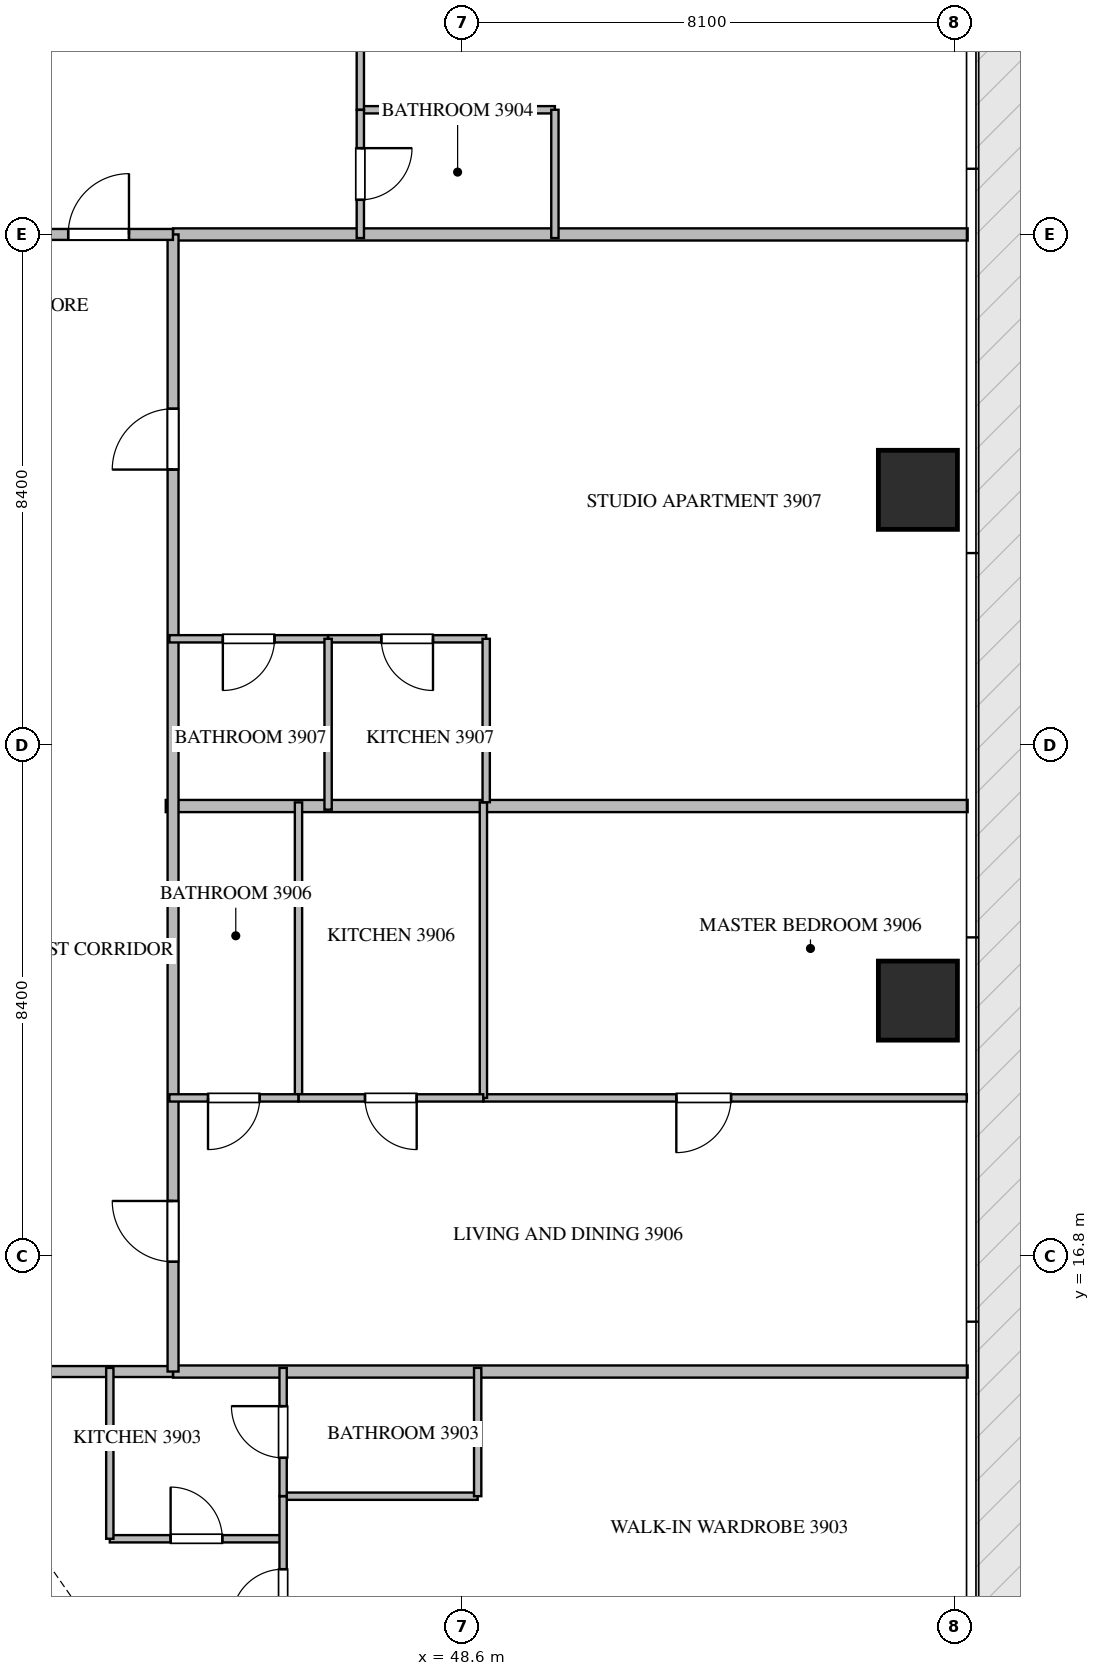
"""IFC4 building model, lengths in metres.
Left out: names, types, materials, properties, quantities, classifications, styles, units other than length and angle.
Written with IfcOpenShell. Run it as: python <this file> out.ifc"""

import sys

from ifc_helpers import new_model, si_unit, direction, frame, frame_2d, origin, origin_2d, place, context, subcontext, project, spatial, rectangle, extrude, source, transform, mapped, element, fill, save


model = new_model("IFC4")
c1 = context("Model", 3, precision=1e-05, world=origin(), true_north=direction((0.0, 1.0)))
c2 = subcontext(c1, "Body", "Model", "MODEL_VIEW")
j1 = project(units=[si_unit("LENGTHUNIT", "METRE"), si_unit("PLANEANGLEUNIT", "RADIAN")], contexts=[c1])
p1 = place(None, origin())
s1 = spatial("IfcSite", under=j1, at=p1, CompositionType="ELEMENT")
p2 = place(p1, origin())
s2 = spatial("IfcBuilding", under=s1, at=p2, CompositionType="ELEMENT")
p3 = place(p2, frame((0.0, 0.0, 157.65)))
s3 = spatial("IfcBuildingStorey", under=s2, at=p3, CompositionType="ELEMENT", Elevation=157.65)
m1 = source(origin(), c2, "Body", "SweptSolid", [
    extrude(rectangle(XDim=1.3, YDim=1.3, at=origin_2d()), origin(), (0.0, 0.0, 1.0), 3.75),
])
for number, where, z_axis, x_axis in (
    (1, (56.1, 21.0, -0.26), (0.0, 0.0, 1.0), (1.0, 0.0, 0.0)),
    (2, (56.1, 29.4, -0.26), (0.0, 0.0, 1.0), (1.0, 0.0, 0.0)),
):
    element("IfcColumn", number, at=place(p3, frame(where, z_axis=z_axis, x_axis=x_axis)), inside=s3, PredefinedType="COLUMN", context=c2, shape_type="MappedRepresentation", body=[
        mapped(m1, transform((0.0, 0.0, 0.0), scale=1.0)),
    ])
p4 = place(p3, frame((43.73, 24.2, 0.0), z_axis=(0.0, 0.0, 1.0), x_axis=(1.0, 0.0, 0.0)))
e3 = element("IfcWall", 3, at=p4, inside=s3, PredefinedType="PARTITIONING", context=c2, shape_type="SweptSolid", body=[
    extrude(rectangle(XDim=13.188, YDim=0.2, at=frame_2d((6.594, 0.0))), origin(), (0.0, 0.0, 1.0), 3.49),
])
for number, where, z_axis, x_axis in (
    (4, (43.85, 14.9, 0.0), (0.0, 0.0, 1.0), (1.0, 0.0, 0.0)),
    (5, (43.85, 33.6, 0.0), (0.0, 0.0, 1.0), (1.0, 0.0, 0.0)),
):
    element("IfcWall", number, at=place(p3, frame(where, z_axis=z_axis, x_axis=x_axis)), inside=s3, PredefinedType="PARTITIONING", context=c2, shape_type="SweptSolid", body=[
        extrude(rectangle(XDim=13.068, YDim=0.2, at=frame_2d((6.534, 0.0))), origin(), (0.0, 0.0, 1.0), 3.49),
    ])
p5 = place(p3, frame((20.952, 14.9, 0.0), z_axis=(0.0, 0.0, 1.0), x_axis=(1.0, 0.0, 0.0)))
e6 = element("IfcWall", 6, at=p5, inside=s3, PredefinedType="PARTITIONING", context=c2, shape_type="SweptSolid", body=[
    extrude(rectangle(XDim=22.896, YDim=0.18, at=frame_2d((11.448, 0.0))), origin(), (0.0, 0.0, 1.0), 3.49),
])
p6 = place(p5, frame((2.54, 0.0, 0.0)))
e7 = element("IfcOpeningElement", 7, at=p6, cuts=e6, PredefinedType="OPENING", context=c2, shape_type="SweptSolid", body=[
    extrude(rectangle(XDim=1.0, YDim=2.15, at=frame_2d((0.5, 1.075))), frame((0.0, 0.1, 0.0), z_axis=(0.0, -1.0, 0.0), x_axis=(1.0, 0.0, 0.0)), (0.0, 0.0, 1.0), 0.2),
])
p7 = place(p5, frame((6.985, 0.0, 0.0)))
e8 = element("IfcOpeningElement", 8, at=p7, cuts=e6, PredefinedType="OPENING", context=c2, shape_type="SweptSolid", body=[
    extrude(rectangle(XDim=1.0, YDim=2.15, at=frame_2d((0.5, 1.075))), frame((0.0, 0.1, 0.0), z_axis=(0.0, -1.0, 0.0), x_axis=(1.0, 0.0, 0.0)), (0.0, 0.0, 1.0), 0.2),
])
p8 = place(p5, frame((19.356, 0.0, 0.0)))
e9 = element("IfcOpeningElement", 9, at=p8, cuts=e6, PredefinedType="OPENING", context=c2, shape_type="SweptSolid", body=[
    extrude(rectangle(XDim=1.0, YDim=2.15, at=frame_2d((0.5, 1.075))), frame((0.0, 0.1, 0.0), z_axis=(0.0, -1.0, 0.0), x_axis=(1.0, 0.0, 0.0)), (0.0, 0.0, 1.0), 0.2),
])
p9 = place(p3, frame((43.85, 14.9, 0.0), z_axis=(0.0, 0.0, 1.0), x_axis=(0.0, 1.0, 0.0)))
e10 = element("IfcWall", 10, at=p9, inside=s3, PredefinedType="PARTITIONING", context=c2, shape_type="SweptSolid", body=[
    extrude(rectangle(XDim=18.7, YDim=0.18, at=frame_2d((9.35, 0.0))), origin(), (0.0, 0.0, 1.0), 3.49),
])
p10 = place(p9, frame((1.805, 0.0, 0.0)))
e11 = element("IfcOpeningElement", 11, at=p10, cuts=e10, PredefinedType="OPENING", context=c2, shape_type="SweptSolid", body=[
    extrude(rectangle(XDim=1.0, YDim=2.15, at=frame_2d((0.5, 1.075))), frame((0.0, 0.1, 0.0), z_axis=(0.0, -1.0, 0.0), x_axis=(1.0, 0.0, 0.0)), (0.0, 0.0, 1.0), 0.2),
])
p11 = place(p9, frame((14.833, 0.0, 0.0)))
e12 = element("IfcOpeningElement", 12, at=p11, cuts=e10, PredefinedType="OPENING", context=c2, shape_type="SweptSolid", body=[
    extrude(rectangle(XDim=1.0, YDim=2.15, at=frame_2d((0.5, 1.075))), frame((0.0, 0.1, 0.0), z_axis=(0.0, -1.0, 0.0), x_axis=(1.0, 0.0, 0.0)), (0.0, 0.0, 1.0), 0.2),
])
p12 = place(p3, frame((41.402, 33.6, 0.0), z_axis=(0.0, 0.0, 1.0), x_axis=(1.0, 0.0, 0.0)))
e13 = element("IfcWall", 13, at=p12, inside=s3, PredefinedType="PARTITIONING", context=c2, shape_type="SweptSolid", body=[
    extrude(rectangle(XDim=2.446, YDim=0.18, at=frame_2d((1.223, 0.0))), origin(), (0.0, 0.0, 1.0), 3.49),
])
p13 = place(p12, frame((0.723, 0.0, 0.0)))
e14 = element("IfcOpeningElement", 14, at=p13, cuts=e13, PredefinedType="OPENING", context=c2, shape_type="SweptSolid", body=[
    extrude(rectangle(XDim=1.0, YDim=2.15, at=frame_2d((0.5, 1.075))), frame((0.0, 0.1, 0.0), z_axis=(0.0, -1.0, 0.0), x_axis=(1.0, 0.0, 0.0)), (0.0, 0.0, 1.0), 0.2),
])
p14 = place(p3, frame((42.81, 12.15, 0.0), z_axis=(0.0, 0.0, 1.0), x_axis=(1.0, 0.0, 0.0)))
e15 = element("IfcWall", 15, at=p14, inside=s3, PredefinedType="PARTITIONING", context=c2, shape_type="SweptSolid", body=[
    extrude(rectangle(XDim=2.85, YDim=0.12, at=frame_2d((1.425, 0.0))), origin(), (0.0, 0.0, 1.0), 3.49),
])
p15 = place(p14, frame((1.0, 0.0, 0.0)))
e16 = element("IfcOpeningElement", 16, at=p15, cuts=e15, PredefinedType="OPENING", context=c2, shape_type="SweptSolid", body=[
    extrude(rectangle(XDim=0.85, YDim=2.1, at=frame_2d((0.425, 1.05))), frame((0.0, 0.07, 0.0), z_axis=(0.0, -1.0, 0.0), x_axis=(1.0, 0.0, 0.0)), (0.0, 0.0, 1.0), 0.14),
])
p16 = place(p3, frame((42.81, 12.15, 0.0), z_axis=(0.0, 0.0, 1.0), x_axis=(0.0, 1.0, 0.0)))
e17 = element("IfcWall", 17, at=p16, inside=s3, PredefinedType="PARTITIONING", context=c2, shape_type="SweptSolid", body=[
    extrude(rectangle(XDim=2.81, YDim=0.12, at=frame_2d((1.405, 0.0))), origin(), (0.0, 0.0, 1.0), 3.49),
])
p17 = place(p3, frame((45.66, 12.85, 0.0), z_axis=(0.0, 0.0, 1.0), x_axis=(1.0, 0.0, 0.0)))
e18 = element("IfcWall", 18, at=p17, inside=s3, PredefinedType="PARTITIONING", context=c2, shape_type="SweptSolid", body=[
    extrude(rectangle(XDim=3.2, YDim=0.12, at=frame_2d((1.6, 0.0))), origin(), (0.0, 0.0, 1.0), 3.49),
])
p18 = place(p3, frame((48.86, 12.85, 0.0), z_axis=(0.0, 0.0, 1.0), x_axis=(0.0, 1.0, 0.0)))
e19 = element("IfcWall", 19, at=p18, inside=s3, PredefinedType="PARTITIONING", context=c2, shape_type="SweptSolid", body=[
    extrude(rectangle(XDim=2.11, YDim=0.12, at=frame_2d((1.055, 0.0))), origin(), (0.0, 0.0, 1.0), 3.49),
])
p19 = place(p3, frame((45.66, 9.6, 0.0), z_axis=(0.0, 0.0, 1.0), x_axis=(0.0, 1.0, 0.0)))
e20 = element("IfcWall", 20, at=p19, inside=s3, PredefinedType="PARTITIONING", context=c2, shape_type="SweptSolid", body=[
    extrude(rectangle(XDim=3.25, YDim=0.12, at=frame_2d((1.625, 0.0))), origin(), (0.0, 0.0, 1.0), 3.49),
])
p20 = place(p19, frame((1.2, 0.0, 0.0)))
e21 = element("IfcOpeningElement", 21, at=p20, cuts=e20, PredefinedType="OPENING", context=c2, shape_type="SweptSolid", body=[
    extrude(rectangle(XDim=0.85, YDim=2.1, at=frame_2d((0.425, 1.05))), frame((0.0, 0.07, 0.0), z_axis=(0.0, -1.0, 0.0), x_axis=(1.0, 0.0, 0.0)), (0.0, 0.0, 1.0), 0.14),
])
p21 = place(p3, frame((45.66, 12.852, 0.0), z_axis=(0.0, 0.0, 1.0), x_axis=(0.0, 1.0, 0.0)))
e22 = element("IfcWall", 22, at=p21, inside=s3, PredefinedType="PARTITIONING", context=c2, shape_type="SweptSolid", body=[
    extrude(rectangle(XDim=2.108, YDim=0.12, at=frame_2d((1.054, 0.0))), origin(), (0.0, 0.0, 1.0), 3.49),
])
p22 = place(p21, frame((0.629, 0.0, 0.0)))
e23 = element("IfcOpeningElement", 23, at=p22, cuts=e22, PredefinedType="OPENING", context=c2, shape_type="SweptSolid", body=[
    extrude(rectangle(XDim=0.85, YDim=2.1, at=frame_2d((0.425, 1.05))), frame((0.0, 0.07, 0.0), z_axis=(0.0, -1.0, 0.0), x_axis=(1.0, 0.0, 0.0)), (0.0, 0.0, 1.0), 0.14),
])
p23 = place(p3, frame((46.93, 35.65, 0.0), z_axis=(0.0, 0.0, 1.0), x_axis=(1.0, 0.0, 0.0)))
e24 = element("IfcWall", 24, at=p23, inside=s3, PredefinedType="PARTITIONING", context=c2, shape_type="SweptSolid", body=[
    extrude(rectangle(XDim=3.2, YDim=0.12, at=frame_2d((1.6, 0.0))), origin(), (0.0, 0.0, 1.0), 3.49),
])
p24 = place(p3, frame((50.13, 35.65, 0.0), z_axis=(0.0, 0.0, 1.0), x_axis=(0.0, -1.0, 0.0)))
e25 = element("IfcWall", 25, at=p24, inside=s3, PredefinedType="PARTITIONING", context=c2, shape_type="SweptSolid", body=[
    extrude(rectangle(XDim=2.11, YDim=0.12, at=frame_2d((1.055, 0.0))), origin(), (0.0, 0.0, 1.0), 3.49),
])
p25 = place(p3, frame((46.93, 41.073, 0.0), z_axis=(0.0, 0.0, 1.0), x_axis=(0.0, -1.0, 0.0)))
e26 = element("IfcWall", 26, at=p25, inside=s3, PredefinedType="PARTITIONING", context=c2, shape_type="SweptSolid", body=[
    extrude(rectangle(XDim=5.423, YDim=0.12, at=frame_2d((2.711, 0.0))), origin(), (0.0, 0.0, 1.0), 3.49),
])
p26 = place(p25, frame((2.287, 0.0, 0.0)))
e27 = element("IfcOpeningElement", 27, at=p26, cuts=e26, PredefinedType="OPENING", context=c2, shape_type="SweptSolid", body=[
    extrude(rectangle(XDim=0.85, YDim=2.1, at=frame_2d((0.425, 1.05))), frame((0.0, 0.07, 0.0), z_axis=(0.0, -1.0, 0.0), x_axis=(1.0, 0.0, 0.0)), (0.0, 0.0, 1.0), 0.14),
])
p27 = place(p3, frame((46.93, 35.648, 0.0), z_axis=(0.0, 0.0, 1.0), x_axis=(0.0, -1.0, 0.0)))
e28 = element("IfcWall", 28, at=p27, inside=s3, PredefinedType="PARTITIONING", context=c2, shape_type="SweptSolid", body=[
    extrude(rectangle(XDim=2.108, YDim=0.12, at=frame_2d((1.054, 0.0))), origin(), (0.0, 0.0, 1.0), 3.49),
])
p28 = place(p27, frame((0.629, 0.0, 0.0)))
e29 = element("IfcOpeningElement", 29, at=p28, cuts=e28, PredefinedType="OPENING", context=c2, shape_type="SweptSolid", body=[
    extrude(rectangle(XDim=0.85, YDim=2.1, at=frame_2d((0.425, 1.05))), frame((0.0, 0.07, 0.0), z_axis=(0.0, -1.0, 0.0), x_axis=(1.0, 0.0, 0.0)), (0.0, 0.0, 1.0), 0.14),
])
p29 = place(p3, frame((56.905, 19.4, 0.0), z_axis=(0.0, 0.0, 1.0), x_axis=(-1.0, 0.0, 0.0)))
e30 = element("IfcWall", 30, at=p29, inside=s3, PredefinedType="PARTITIONING", context=c2, shape_type="SweptSolid", body=[
    extrude(rectangle(XDim=7.951, YDim=0.12, at=frame_2d((3.976, 0.0))), origin(), (0.0, 0.0, 1.0), 3.49),
])
p30 = place(p29, frame((3.878, 0.0, 0.0)))
e31 = element("IfcOpeningElement", 31, at=p30, cuts=e30, PredefinedType="OPENING", context=c2, shape_type="SweptSolid", body=[
    extrude(rectangle(XDim=0.9, YDim=2.1, at=frame_2d((0.45, 1.05))), frame((0.0, 0.07, 0.0), z_axis=(0.0, -1.0, 0.0), x_axis=(1.0, 0.0, 0.0)), (0.0, 0.0, 1.0), 0.14),
])
for number, where, z_axis, x_axis in (
    (32, (48.954, 19.4, 0.0), (0.0, 0.0, 1.0), (0.0, 1.0, 0.0)),
    (33, (45.913, 19.4, 0.0), (0.0, 0.0, 1.0), (0.0, 1.0, 0.0)),
):
    element("IfcWall", number, at=place(p3, frame(where, z_axis=z_axis, x_axis=x_axis)), inside=s3, PredefinedType="PARTITIONING", context=c2, shape_type="SweptSolid", body=[
        extrude(rectangle(XDim=4.86, YDim=0.12, at=frame_2d((2.43, 0.0))), origin(), (0.0, 0.0, 1.0), 3.49),
    ])
p31 = place(p3, frame((48.952, 19.4, 0.0), z_axis=(0.0, 0.0, 1.0), x_axis=(-1.0, 0.0, 0.0)))
e34 = element("IfcWall", 34, at=p31, inside=s3, PredefinedType="PARTITIONING", context=c2, shape_type="SweptSolid", body=[
    extrude(rectangle(XDim=3.039, YDim=0.12, at=frame_2d((1.52, 0.0))), origin(), (0.0, 0.0, 1.0), 3.49),
])
p32 = place(p31, frame((1.095, 0.0, 0.0)))
e35 = element("IfcOpeningElement", 35, at=p32, cuts=e34, PredefinedType="OPENING", context=c2, shape_type="SweptSolid", body=[
    extrude(rectangle(XDim=0.85, YDim=2.1, at=frame_2d((0.425, 1.05))), frame((0.0, 0.07, 0.0), z_axis=(0.0, -1.0, 0.0), x_axis=(1.0, 0.0, 0.0)), (0.0, 0.0, 1.0), 0.14),
])
p33 = place(p3, frame((45.911, 19.4, 0.0), z_axis=(0.0, 0.0, 1.0), x_axis=(-1.0, 0.0, 0.0)))
e36 = element("IfcWall", 36, at=p33, inside=s3, PredefinedType="PARTITIONING", context=c2, shape_type="SweptSolid", body=[
    extrude(rectangle(XDim=2.121, YDim=0.12, at=frame_2d((1.061, 0.0))), origin(), (0.0, 0.0, 1.0), 3.49),
])
p34 = place(p33, frame((0.636, 0.0, 0.0)))
e37 = element("IfcOpeningElement", 37, at=p34, cuts=e36, PredefinedType="OPENING", context=c2, shape_type="SweptSolid", body=[
    extrude(rectangle(XDim=0.85, YDim=2.1, at=frame_2d((0.425, 1.05))), frame((0.0, 0.07, 0.0), z_axis=(0.0, -1.0, 0.0), x_axis=(1.0, 0.0, 0.0)), (0.0, 0.0, 1.0), 0.14),
])
p35 = place(p3, frame((49.0, 26.95, 0.0), z_axis=(0.0, 0.0, 1.0), x_axis=(-1.0, 0.0, 0.0)))
e38 = element("IfcWall", 38, at=p35, inside=s3, PredefinedType="PARTITIONING", context=c2, shape_type="SweptSolid", body=[
    extrude(rectangle(XDim=2.6, YDim=0.12, at=frame_2d((1.3, 0.0))), origin(), (0.0, 0.0, 1.0), 3.49),
])
p36 = place(p35, frame((0.875, 0.0, 0.0)))
e39 = element("IfcOpeningElement", 39, at=p36, cuts=e38, PredefinedType="OPENING", context=c2, shape_type="SweptSolid", body=[
    extrude(rectangle(XDim=0.85, YDim=2.1, at=frame_2d((0.425, 1.05))), frame((0.0, 0.07, 0.0), z_axis=(0.0, -1.0, 0.0), x_axis=(1.0, 0.0, 0.0)), (0.0, 0.0, 1.0), 0.14),
])
p37 = place(p3, frame((46.398, 26.95, 0.0), z_axis=(0.0, 0.0, 1.0), x_axis=(-1.0, 0.0, 0.0)))
e40 = element("IfcWall", 40, at=p37, inside=s3, PredefinedType="PARTITIONING", context=c2, shape_type="SweptSolid", body=[
    extrude(rectangle(XDim=2.608, YDim=0.12, at=frame_2d((1.304, 0.0))), origin(), (0.0, 0.0, 1.0), 3.49),
])
p38 = place(p37, frame((0.879, 0.0, 0.0)))
e41 = element("IfcOpeningElement", 41, at=p38, cuts=e40, PredefinedType="OPENING", context=c2, shape_type="SweptSolid", body=[
    extrude(rectangle(XDim=0.85, YDim=2.1, at=frame_2d((0.425, 1.05))), frame((0.0, 0.07, 0.0), z_axis=(0.0, -1.0, 0.0), x_axis=(1.0, 0.0, 0.0)), (0.0, 0.0, 1.0), 0.14),
])
p39 = place(p3, frame((46.4, 24.14, 0.0), z_axis=(0.0, 0.0, 1.0), x_axis=(0.0, 1.0, 0.0)))
e42 = element("IfcWall", 42, at=p39, inside=s3, PredefinedType="PARTITIONING", context=c2, shape_type="SweptSolid", body=[
    extrude(rectangle(XDim=2.81, YDim=0.12, at=frame_2d((1.405, 0.0))), origin(), (0.0, 0.0, 1.0), 3.49),
])
p40 = place(p3, frame((49.0, 24.262, 0.0), z_axis=(0.0, 0.0, 1.0), x_axis=(0.0, 1.0, 0.0)))
e43 = element("IfcWall", 43, at=p40, inside=s3, PredefinedType="PARTITIONING", context=c2, shape_type="SweptSolid", body=[
    extrude(rectangle(XDim=2.688, YDim=0.12, at=frame_2d((1.344, 0.0))), origin(), (0.0, 0.0, 1.0), 3.49),
])
m2 = source(origin(), c2, "Body", "SweptSolid", [
    extrude(rectangle(XDim=1.0, YDim=2.15, at=frame_2d((0.5, 1.075))), frame((0.0, 0.025, 0.0), z_axis=(0.0, -1.0, 0.0), x_axis=(1.0, 0.0, 0.0)), (0.0, 0.0, 1.0), 0.05),
])
p41 = place(p10, origin())
e44 = element("IfcDoor", 44, at=p41, inside=s3, OperationType="SINGLE_SWING_RIGHT", PredefinedType="DOOR", context=c2, shape_type="MappedRepresentation", body=[
    mapped(m2, transform((0.0, 0.0, 0.0), scale=1.0)),
])
fill(e11, e44)
p42 = place(p11, origin())
e45 = element("IfcDoor", 45, at=p42, inside=s3, OperationType="SINGLE_SWING_LEFT", PredefinedType="DOOR", context=c2, shape_type="MappedRepresentation", body=[
    mapped(m2, transform((0.0, 0.0, 0.0), scale=1.0)),
])
fill(e12, e45)
p43 = place(p13, origin())
e46 = element("IfcDoor", 46, at=p43, inside=s3, OperationType="SINGLE_SWING_RIGHT", PredefinedType="DOOR", context=c2, shape_type="MappedRepresentation", body=[
    mapped(m2, transform((0.0, 0.0, 0.0), scale=1.0)),
])
fill(e14, e46)
m3 = source(origin(), c2, "Body", "SweptSolid", [
    extrude(rectangle(XDim=0.85, YDim=2.1, at=frame_2d((0.425, 1.05))), frame((0.0, 0.025, 0.0), z_axis=(0.0, -1.0, 0.0), x_axis=(1.0, 0.0, 0.0)), (0.0, 0.0, 1.0), 0.05),
])
p44 = place(p15, origin())
e47 = element("IfcDoor", 47, at=p44, inside=s3, OperationType="SINGLE_SWING_LEFT", PredefinedType="DOOR", context=c2, shape_type="MappedRepresentation", body=[
    mapped(m3, transform((0.0, 0.0, 0.0), scale=1.0)),
])
fill(e16, e47)
p45 = place(p20, origin())
e48 = element("IfcDoor", 48, at=p45, inside=s3, OperationType="SINGLE_SWING_LEFT", PredefinedType="DOOR", context=c2, shape_type="MappedRepresentation", body=[
    mapped(m3, transform((0.0, 0.0, 0.0), scale=1.0)),
])
fill(e21, e48)
p46 = place(p22, origin())
e49 = element("IfcDoor", 49, at=p46, inside=s3, OperationType="SINGLE_SWING_RIGHT", PredefinedType="DOOR", context=c2, shape_type="MappedRepresentation", body=[
    mapped(m3, transform((0.0, 0.0, 0.0), scale=1.0)),
])
fill(e23, e49)
p47 = place(p28, origin())
e50 = element("IfcDoor", 50, at=p47, inside=s3, OperationType="SINGLE_SWING_LEFT", PredefinedType="DOOR", context=c2, shape_type="MappedRepresentation", body=[
    mapped(m3, transform((0.0, 0.0, 0.0), scale=1.0)),
])
fill(e29, e50)
m4 = source(origin(), c2, "Body", "SweptSolid", [
    extrude(rectangle(XDim=0.9, YDim=2.1, at=frame_2d((0.45, 1.05))), frame((0.0, 0.025, 0.0), z_axis=(0.0, -1.0, 0.0), x_axis=(1.0, 0.0, 0.0)), (0.0, 0.0, 1.0), 0.05),
])
p48 = place(p30, origin())
e51 = element("IfcDoor", 51, at=p48, inside=s3, OperationType="SINGLE_SWING_RIGHT", PredefinedType="DOOR", context=c2, shape_type="MappedRepresentation", body=[
    mapped(m4, transform((0.0, 0.0, 0.0), scale=1.0)),
])
fill(e31, e51)
p49 = place(p32, origin())
e52 = element("IfcDoor", 52, at=p49, inside=s3, OperationType="SINGLE_SWING_LEFT", PredefinedType="DOOR", context=c2, shape_type="MappedRepresentation", body=[
    mapped(m3, transform((0.0, 0.0, 0.0), scale=1.0)),
])
fill(e35, e52)
p50 = place(p34, origin())
e53 = element("IfcDoor", 53, at=p50, inside=s3, OperationType="SINGLE_SWING_RIGHT", PredefinedType="DOOR", context=c2, shape_type="MappedRepresentation", body=[
    mapped(m3, transform((0.0, 0.0, 0.0), scale=1.0)),
])
fill(e37, e53)
p51 = place(p36, origin())
e54 = element("IfcDoor", 54, at=p51, inside=s3, OperationType="SINGLE_SWING_LEFT", PredefinedType="DOOR", context=c2, shape_type="MappedRepresentation", body=[
    mapped(m3, transform((0.0, 0.0, 0.0), scale=1.0)),
])
fill(e39, e54)
p52 = place(p38, origin())
e55 = element("IfcDoor", 55, at=p52, inside=s3, OperationType="SINGLE_SWING_RIGHT", PredefinedType="DOOR", context=c2, shape_type="MappedRepresentation", body=[
    mapped(m3, transform((0.0, 0.0, 0.0), scale=1.0)),
])
fill(e41, e55)
save(model, sys.argv[1])
